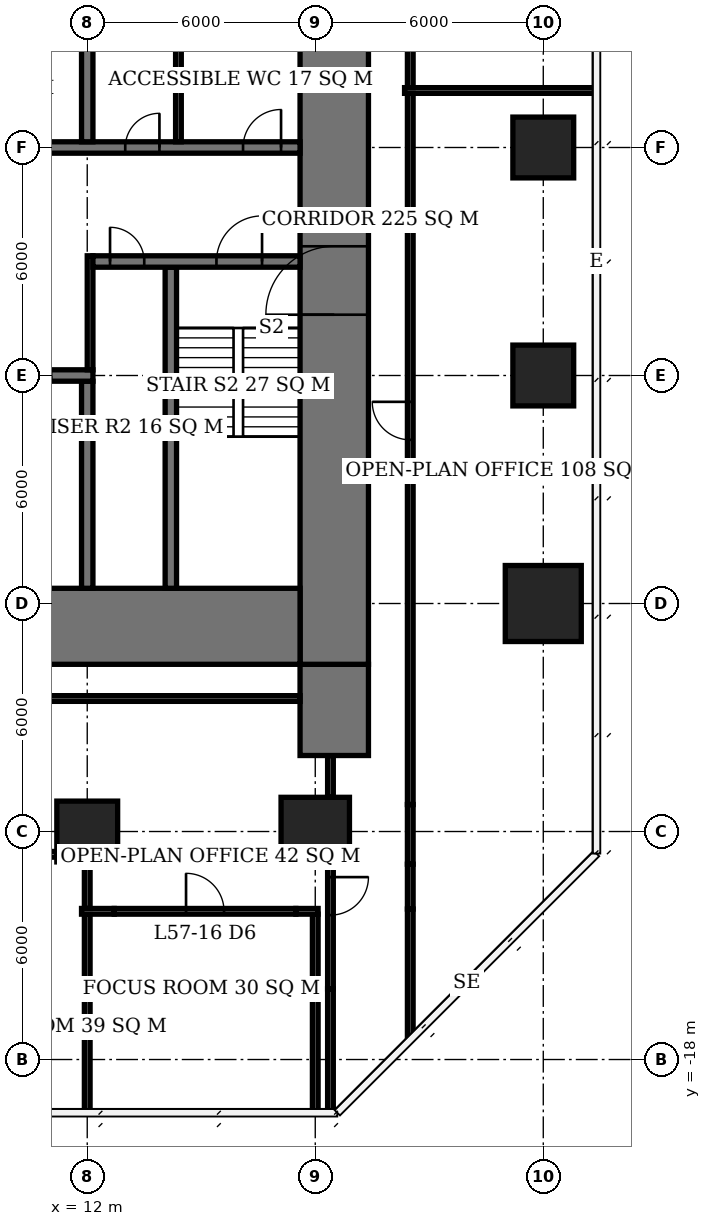
"""IFC4 building model, lengths in metres.
Left out: names, types, materials, properties, quantities, classifications, styles, units other than length and angle.
Written with IfcOpenShell. Run it as: python <this file> out.ifc"""

import sys

from ifc_helpers import new_model, si_unit, direction, frame, frame_2d, origin, origin_2d, place, context, subcontext, project, spatial, rectangle, extrude, element, fill, save


model = new_model("IFC4")
c1 = context("Model", 3, precision=1e-05, world=origin(), true_north=direction((0.0, 1.0)))
c2 = subcontext(c1, "Body", "Model", "MODEL_VIEW")
j1 = project(units=[si_unit("LENGTHUNIT", "METRE"), si_unit("PLANEANGLEUNIT", "RADIAN")], contexts=[c1])
p1 = place(None, origin())
s1 = spatial("IfcSite", under=j1, at=p1, CompositionType="ELEMENT")
p2 = place(p1, origin())
s2 = spatial("IfcBuilding", under=s1, at=p2, CompositionType="ELEMENT")
p3 = place(p2, frame((0.0, 0.0, 231.8)))
s3 = spatial("IfcBuildingStorey", under=s2, at=p3, CompositionType="ELEMENT", Elevation=231.8)
p4 = place(p3, frame((12.0, -12.0, 0.0), z_axis=(0.0, 0.0, 1.0), x_axis=(1.0, 0.0, 0.0)))
e1 = element("IfcColumn", 1, at=p4, inside=s3, PredefinedType="COLUMN", context=c2, shape_type="SweptSolid", body=[
    extrude(rectangle(XDim=1.6, YDim=1.6, at=origin_2d()), origin(), (0.0, 0.0, 1.0), 3.9),
])
p5 = place(p3, frame((18.0, -12.0, 0.0), z_axis=(0.0, 0.0, 1.0), x_axis=(1.0, 0.0, 0.0)))
e2 = element("IfcColumn", 2, at=p5, inside=s3, PredefinedType="COLUMN", context=c2, shape_type="SweptSolid", body=[
    extrude(rectangle(XDim=1.8, YDim=1.8, at=origin_2d()), origin(), (0.0, 0.0, 1.0), 3.9),
])
p6 = place(p3, frame((24.0, -6.0, 0.0), z_axis=(0.0, 0.0, 1.0), x_axis=(1.0, 0.0, 0.0)))
e3 = element("IfcColumn", 3, at=p6, inside=s3, PredefinedType="COLUMN", context=c2, shape_type="SweptSolid", body=[
    extrude(rectangle(XDim=2.0, YDim=2.0, at=origin_2d()), origin(), (0.0, 0.0, 1.0), 3.9),
])
for number, where, z_axis, x_axis in (
    (4, (24.0, 0.0, 0.0), (0.0, 0.0, 1.0), (1.0, 0.0, 0.0)),
    (5, (24.0, 6.0, 0.0), (0.0, 0.0, 1.0), (1.0, 0.0, 0.0)),
):
    element("IfcColumn", number, at=place(p3, frame(where, z_axis=z_axis, x_axis=x_axis)), inside=s3, PredefinedType="COLUMN", context=c2, shape_type="SweptSolid", body=[
        extrude(rectangle(XDim=1.6, YDim=1.6, at=origin_2d()), origin(), (0.0, 0.0, 1.0), 3.9),
    ])
p7 = place(p3, frame((-5.6, -6.6, 0.0), z_axis=(0.0, 0.0, 1.0), x_axis=(1.0, 0.0, 0.0)))
e6 = element("IfcWall", 6, at=p7, inside=s3, PredefinedType="SHEAR", context=c2, shape_type="SweptSolid", body=[
    extrude(rectangle(XDim=23.2, YDim=2.0, at=frame_2d((11.6, 0.0))), origin(), (0.0, 0.0, 1.0), 3.9),
])
p8 = place(p3, frame((18.5, -7.6, 0.0), z_axis=(0.0, 0.0, 1.0), x_axis=(0.0, 1.0, 0.0)))
e7 = element("IfcWall", 7, at=p8, inside=s3, PredefinedType="SHEAR", context=c2, shape_type="SweptSolid", body=[
    extrude(rectangle(XDim=21.2, YDim=1.8, at=frame_2d((10.6, 0.0))), origin(), (0.0, 0.0, 1.0), 3.9),
])
p9 = place(p8, frame((9.2, 0.0, 0.0)))
e8 = element("IfcOpeningElement", 8, at=p9, cuts=e7, PredefinedType="OPENING", context=c2, shape_type="SweptSolid", body=[
    extrude(rectangle(XDim=1.8, YDim=2.4, at=frame_2d((0.9, 1.2))), frame((0.0, 0.91, 0.0), z_axis=(0.0, -1.0, 0.0), x_axis=(1.0, 0.0, 0.0)), (0.0, 0.0, 1.0), 1.82),
])
p10 = place(p3, frame((18.5, -10.0, 0.0), z_axis=(0.0, 0.0, 1.0), x_axis=(0.0, 1.0, 0.0)))
e9 = element("IfcWall", 9, at=p10, inside=s3, PredefinedType="SHEAR", context=c2, shape_type="SweptSolid", body=[
    extrude(rectangle(XDim=2.4, YDim=1.8, at=frame_2d((1.2, 0.0))), origin(), (0.0, 0.0, 1.0), 3.9),
])
p11 = place(p3, frame((-5.6, 0.0, 0.0), z_axis=(0.0, 0.0, 1.0), x_axis=(1.0, 0.0, 0.0)))
e10 = element("IfcWall", 10, at=p11, inside=s3, PredefinedType="SHEAR", context=c2, shape_type="SweptSolid", body=[
    extrude(rectangle(XDim=17.75, YDim=0.3, at=frame_2d((8.875, 0.0))), origin(), (0.0, 0.0, 1.0), 3.9),
])
p12 = place(p11, frame((0.6, 0.0, 0.0)))
e11 = element("IfcOpeningElement", 11, at=p12, cuts=e10, PredefinedType="OPENING", context=c2, shape_type="SweptSolid", body=[
    extrude(rectangle(XDim=0.9, YDim=2.1, at=frame_2d((0.45, 1.05))), frame((0.0, 0.16, 0.0), z_axis=(0.0, -1.0, 0.0), x_axis=(1.0, 0.0, 0.0)), (0.0, 0.0, 1.0), 0.32),
])
p13 = place(p11, frame((3.7, 0.0, 0.0)))
e12 = element("IfcOpeningElement", 12, at=p13, cuts=e10, PredefinedType="OPENING", context=c2, shape_type="SweptSolid", body=[
    extrude(rectangle(XDim=0.9, YDim=2.1, at=frame_2d((0.45, 1.05))), frame((0.0, 0.16, 0.0), z_axis=(0.0, -1.0, 0.0), x_axis=(1.0, 0.0, 0.0)), (0.0, 0.0, 1.0), 0.32),
])
p14 = place(p11, frame((9.6, 0.0, 0.0)))
e13 = element("IfcOpeningElement", 13, at=p14, cuts=e10, PredefinedType="OPENING", context=c2, shape_type="SweptSolid", body=[
    extrude(rectangle(XDim=1.0, YDim=2.1, at=frame_2d((0.5, 1.05))), frame((0.0, 0.16, 0.0), z_axis=(0.0, -1.0, 0.0), x_axis=(1.0, 0.0, 0.0)), (0.0, 0.0, 1.0), 0.32),
])
p15 = place(p11, frame((12.55, 0.0, 0.0)))
e14 = element("IfcOpeningElement", 14, at=p15, cuts=e10, PredefinedType="OPENING", context=c2, shape_type="SweptSolid", body=[
    extrude(rectangle(XDim=1.1, YDim=2.1, at=frame_2d((0.55, 1.05))), frame((0.0, 0.16, 0.0), z_axis=(0.0, -1.0, 0.0), x_axis=(1.0, 0.0, 0.0)), (0.0, 0.0, 1.0), 0.32),
])
p16 = place(p11, frame((15.55, 0.0, 0.0)))
e15 = element("IfcOpeningElement", 15, at=p16, cuts=e10, PredefinedType="OPENING", context=c2, shape_type="SweptSolid", body=[
    extrude(rectangle(XDim=1.1, YDim=2.1, at=frame_2d((0.55, 1.05))), frame((0.0, 0.16, 0.0), z_axis=(0.0, -1.0, 0.0), x_axis=(1.0, 0.0, 0.0)), (0.0, 0.0, 1.0), 0.32),
])
p17 = place(p3, frame((12.15, 3.0, 0.0), z_axis=(0.0, 0.0, 1.0), x_axis=(1.0, 0.0, 0.0)))
e16 = element("IfcWall", 16, at=p17, inside=s3, PredefinedType="SHEAR", context=c2, shape_type="SweptSolid", body=[
    extrude(rectangle(XDim=5.45, YDim=0.3, at=frame_2d((2.725, 0.0))), origin(), (0.0, 0.0, 1.0), 3.9),
])
p18 = place(p17, frame((3.25, 0.0, 0.0)))
e17 = element("IfcOpeningElement", 17, at=p18, cuts=e16, PredefinedType="OPENING", context=c2, shape_type="SweptSolid", body=[
    extrude(rectangle(XDim=1.2, YDim=2.1, at=frame_2d((0.6, 1.05))), frame((0.0, 0.16, 0.0), z_axis=(0.0, -1.0, 0.0), x_axis=(1.0, 0.0, 0.0)), (0.0, 0.0, 1.0), 0.32),
])
p19 = place(p17, frame((0.45, 0.0, 0.0)))
e18 = element("IfcOpeningElement", 18, at=p19, cuts=e16, PredefinedType="OPENING", context=c2, shape_type="SweptSolid", body=[
    extrude(rectangle(XDim=0.9, YDim=2.1, at=frame_2d((0.45, 1.05))), frame((0.0, 0.16, 0.0), z_axis=(0.0, -1.0, 0.0), x_axis=(1.0, 0.0, 0.0)), (0.0, 0.0, 1.0), 0.32),
])
p20 = place(p3, frame((-0.15, 6.0, 0.0), z_axis=(0.0, 0.0, 1.0), x_axis=(1.0, 0.0, 0.0)))
e19 = element("IfcWall", 19, at=p20, inside=s3, PredefinedType="SHEAR", context=c2, shape_type="SweptSolid", body=[
    extrude(rectangle(XDim=17.75, YDim=0.3, at=frame_2d((8.875, 0.0))), origin(), (0.0, 0.0, 1.0), 3.9),
])
p21 = place(p20, frame((13.15, 0.0, 0.0)))
e20 = element("IfcOpeningElement", 20, at=p21, cuts=e19, PredefinedType="OPENING", context=c2, shape_type="SweptSolid", body=[
    extrude(rectangle(XDim=0.9, YDim=2.1, at=frame_2d((0.45, 1.05))), frame((0.0, 0.16, 0.0), z_axis=(0.0, -1.0, 0.0), x_axis=(1.0, 0.0, 0.0)), (0.0, 0.0, 1.0), 0.32),
])
p22 = place(p20, frame((16.25, 0.0, 0.0)))
e21 = element("IfcOpeningElement", 21, at=p22, cuts=e19, PredefinedType="OPENING", context=c2, shape_type="SweptSolid", body=[
    extrude(rectangle(XDim=1.0, YDim=2.1, at=frame_2d((0.5, 1.05))), frame((0.0, 0.16, 0.0), z_axis=(0.0, -1.0, 0.0), x_axis=(1.0, 0.0, 0.0)), (0.0, 0.0, 1.0), 0.32),
])
p23 = place(p20, frame((7.25, 0.0, 0.0)))
e22 = element("IfcOpeningElement", 22, at=p23, cuts=e19, PredefinedType="OPENING", context=c2, shape_type="SweptSolid", body=[
    extrude(rectangle(XDim=1.0, YDim=2.1, at=frame_2d((0.5, 1.05))), frame((0.0, 0.16, 0.0), z_axis=(0.0, -1.0, 0.0), x_axis=(1.0, 0.0, 0.0)), (0.0, 0.0, 1.0), 0.32),
])
p24 = place(p20, frame((1.1, 0.0, 0.0)))
e23 = element("IfcOpeningElement", 23, at=p24, cuts=e19, PredefinedType="OPENING", context=c2, shape_type="SweptSolid", body=[
    extrude(rectangle(XDim=1.1, YDim=2.1, at=frame_2d((0.55, 1.05))), frame((0.0, 0.16, 0.0), z_axis=(0.0, -1.0, 0.0), x_axis=(1.0, 0.0, 0.0)), (0.0, 0.0, 1.0), 0.32),
])
p25 = place(p20, frame((4.1, 0.0, 0.0)))
e24 = element("IfcOpeningElement", 24, at=p25, cuts=e19, PredefinedType="OPENING", context=c2, shape_type="SweptSolid", body=[
    extrude(rectangle(XDim=1.1, YDim=2.1, at=frame_2d((0.55, 1.05))), frame((0.0, 0.16, 0.0), z_axis=(0.0, -1.0, 0.0), x_axis=(1.0, 0.0, 0.0)), (0.0, 0.0, 1.0), 0.32),
])
for number, where, z_axis, x_axis in (
    (25, (12.0, -5.6, 0.0), (0.0, 0.0, 1.0), (0.0, 1.0, 0.0)),
    (26, (12.0, 6.15, 0.0), (0.0, 0.0, 1.0), (0.0, 1.0, 0.0)),
):
    element("IfcWall", number, at=place(p3, frame(where, z_axis=z_axis, x_axis=x_axis)), inside=s3, PredefinedType="SHEAR", context=c2, shape_type="SweptSolid", body=[
        extrude(rectangle(XDim=5.45, YDim=0.3, at=frame_2d((2.725, 0.0))), origin(), (0.0, 0.0, 1.0), 3.9),
    ])
p26 = place(p3, frame((14.2, -5.6, 0.0), z_axis=(0.0, 0.0, 1.0), x_axis=(0.0, 1.0, 0.0)))
e27 = element("IfcWall", 27, at=p26, inside=s3, PredefinedType="SHEAR", context=c2, shape_type="SweptSolid", body=[
    extrude(rectangle(XDim=8.45, YDim=0.3, at=frame_2d((4.225, 0.0))), origin(), (0.0, 0.0, 1.0), 3.9),
])
p27 = place(p3, frame((14.4, 6.15, 0.0), z_axis=(0.0, 0.0, 1.0), x_axis=(0.0, 1.0, 0.0)))
e28 = element("IfcWall", 28, at=p27, inside=s3, PredefinedType="PLUMBINGWALL", context=c2, shape_type="SweptSolid", body=[
    extrude(rectangle(XDim=5.45, YDim=0.15, at=frame_2d((2.725, 0.0))), origin(), (0.0, 0.0, 1.0), 3.65),
])
p28 = place(p3, frame((11.85, -14.1, 0.0), z_axis=(0.0, 0.0, 1.0), x_axis=(1.0, 0.0, 0.0)))
e29 = element("IfcWall", 29, at=p28, inside=s3, PredefinedType="PARTITIONING", context=c2, shape_type="SweptSolid", body=[
    extrude(rectangle(XDim=0.86, YDim=0.15, at=frame_2d((0.43, 0.0))), origin(), (0.0, 0.0, 1.0), 2.65),
])
p29 = place(p3, frame((12.71, -14.1, 0.0), z_axis=(0.0, 0.0, 1.0), x_axis=(1.0, 0.0, 0.0)))
e30 = element("IfcWall", 30, at=p29, inside=s3, PredefinedType="PARTITIONING", context=c2, shape_type="SweptSolid", body=[
    extrude(rectangle(XDim=4.78, YDim=0.15, at=frame_2d((2.39, 0.0))), origin(), (0.0, 0.0, 1.0), 3.65),
])
p30 = place(p29, frame((1.89, 0.0, 0.0)))
e31 = element("IfcOpeningElement", 31, at=p30, cuts=e30, PredefinedType="OPENING", context=c2, shape_type="SweptSolid", body=[
    extrude(rectangle(XDim=1.0, YDim=2.1, at=frame_2d((0.5, 1.05))), frame((0.0, 0.085, 0.0), z_axis=(0.0, -1.0, 0.0), x_axis=(1.0, 0.0, 0.0)), (0.0, 0.0, 1.0), 0.17),
])
p31 = place(p3, frame((17.49, -14.1, 0.0), z_axis=(0.0, 0.0, 1.0), x_axis=(1.0, 0.0, 0.0)))
e32 = element("IfcWall", 32, at=p31, inside=s3, PredefinedType="PARTITIONING", context=c2, shape_type="SweptSolid", body=[
    extrude(rectangle(XDim=0.585, YDim=0.15, at=frame_2d((0.292, 0.0))), origin(), (0.0, 0.0, 1.0), 2.65),
])
p32 = place(p3, frame((6.8, -12.6, 0.0), z_axis=(0.0, 0.0, 1.0), x_axis=(1.0, 0.0, 0.0)))
e33 = element("IfcWall", 33, at=p32, inside=s3, PredefinedType="PARTITIONING", context=c2, shape_type="SweptSolid", body=[
    extrude(rectangle(XDim=4.4, YDim=0.15, at=frame_2d((2.2, 0.0))), origin(), (0.0, 0.0, 1.0), 3.65),
])
p33 = place(p32, frame((1.7, 0.0, 0.0)))
e34 = element("IfcOpeningElement", 34, at=p33, cuts=e33, PredefinedType="OPENING", context=c2, shape_type="SweptSolid", body=[
    extrude(rectangle(XDim=1.0, YDim=2.1, at=frame_2d((0.5, 1.05))), frame((0.0, 0.085, 0.0), z_axis=(0.0, -1.0, 0.0), x_axis=(1.0, 0.0, 0.0)), (0.0, 0.0, 1.0), 0.17),
])
p34 = place(p3, frame((12.0, -19.4, 0.0), z_axis=(0.0, 0.0, 1.0), x_axis=(0.0, 1.0, 0.0)))
e35 = element("IfcWall", 35, at=p34, inside=s3, PredefinedType="PARTITIONING", context=c2, shape_type="SweptSolid", body=[
    extrude(rectangle(XDim=3.09, YDim=0.15, at=frame_2d((1.545, 0.0))), origin(), (0.0, 0.0, 1.0), 3.65),
])
p35 = place(p3, frame((12.0, -16.31, 0.0), z_axis=(0.0, 0.0, 1.0), x_axis=(0.0, 1.0, 0.0)))
e36 = element("IfcWall", 36, at=p35, inside=s3, PredefinedType="PARTITIONING", context=c2, shape_type="SweptSolid", body=[
    extrude(rectangle(XDim=2.135, YDim=0.15, at=frame_2d((1.067, 0.0))), origin(), (0.0, 0.0, 1.0), 2.65),
])
p36 = place(p3, frame((12.0, -14.025, 0.0), z_axis=(0.0, 0.0, 1.0), x_axis=(0.0, 1.0, 0.0)))
e37 = element("IfcWall", 37, at=p36, inside=s3, PredefinedType="PARTITIONING", context=c2, shape_type="SweptSolid", body=[
    extrude(rectangle(XDim=1.225, YDim=0.15, at=frame_2d((0.612, 0.0))), origin(), (0.0, 0.0, 1.0), 2.65),
])
p37 = place(p3, frame((18.0, -19.4, 0.0), z_axis=(0.0, 0.0, 1.0), x_axis=(0.0, 1.0, 0.0)))
e38 = element("IfcWall", 38, at=p37, inside=s3, PredefinedType="PARTITIONING", context=c2, shape_type="SweptSolid", body=[
    extrude(rectangle(XDim=3.09, YDim=0.15, at=frame_2d((1.545, 0.0))), origin(), (0.0, 0.0, 1.0), 3.65),
])
p38 = place(p3, frame((18.0, -16.31, 0.0), z_axis=(0.0, 0.0, 1.0), x_axis=(0.0, 1.0, 0.0)))
e39 = element("IfcWall", 39, at=p38, inside=s3, PredefinedType="PARTITIONING", context=c2, shape_type="SweptSolid", body=[
    extrude(rectangle(XDim=2.135, YDim=0.15, at=frame_2d((1.067, 0.0))), origin(), (0.0, 0.0, 1.0), 2.65),
])
p39 = place(p3, frame((10.575, -8.5, 0.0), z_axis=(0.0, 0.0, 1.0), x_axis=(1.0, 0.0, 0.0)))
e40 = element("IfcWall", 40, at=p39, inside=s3, PredefinedType="PARTITIONING", context=c2, shape_type="SweptSolid", body=[
    extrude(rectangle(XDim=7.025, YDim=0.15, at=frame_2d((3.513, 0.0))), origin(), (0.0, 0.0, 1.0), 3.65),
])
p40 = place(p3, frame((18.4, -19.4, 0.0), z_axis=(0.0, 0.0, 1.0), x_axis=(0.0, 1.0, 0.0)))
e41 = element("IfcWall", 41, at=p40, inside=s3, PredefinedType="PARTITIONING", context=c2, shape_type="SweptSolid", body=[
    extrude(rectangle(XDim=3.26, YDim=0.15, at=frame_2d((1.63, 0.0))), origin(), (0.0, 0.0, 1.0), 3.65),
])
p41 = place(p3, frame((18.4, -12.9, 0.0), z_axis=(0.0, 0.0, 1.0), x_axis=(0.0, -1.0, 0.0)))
e42 = element("IfcWall", 42, at=p41, inside=s3, PredefinedType="PARTITIONING", context=c2, shape_type="SweptSolid", body=[
    extrude(rectangle(XDim=3.24, YDim=0.15, at=frame_2d((1.62, 0.0))), origin(), (0.0, 0.0, 1.0), 2.65),
])
p42 = place(p41, frame((0.3, 0.0, 0.0)))
e43 = element("IfcOpeningElement", 43, at=p42, cuts=e42, PredefinedType="OPENING", context=c2, shape_type="SweptSolid", body=[
    extrude(rectangle(XDim=1.0, YDim=2.1, at=frame_2d((0.5, 1.05))), frame((0.0, 0.085, 0.0), z_axis=(0.0, -1.0, 0.0), x_axis=(1.0, 0.0, 0.0)), (0.0, 0.0, 1.0), 0.17),
])
p43 = place(p3, frame((18.4, -11.1, 0.0), z_axis=(0.0, 0.0, 1.0), x_axis=(0.0, 1.0, 0.0)))
e44 = element("IfcWall", 44, at=p43, inside=s3, PredefinedType="PARTITIONING", context=c2, shape_type="SweptSolid", body=[
    extrude(rectangle(XDim=1.1, YDim=0.15, at=frame_2d((0.55, 0.0))), origin(), (0.0, 0.0, 1.0), 3.65),
])
p44 = place(p3, frame((20.5, -17.388, 0.0), z_axis=(0.0, 0.0, 1.0), x_axis=(0.0, 1.0, 0.0)))
e45 = element("IfcWall", 45, at=p44, inside=s3, PredefinedType="PARTITIONING", context=c2, shape_type="SweptSolid", body=[
    extrude(rectangle(XDim=3.348, YDim=0.15, at=frame_2d((1.674, 0.0))), origin(), (0.0, 0.0, 1.0), 3.65),
])
p45 = place(p3, frame((20.5, -14.04, 0.0), z_axis=(0.0, 0.0, 1.0), x_axis=(0.0, 1.0, 0.0)))
e46 = element("IfcWall", 46, at=p45, inside=s3, PredefinedType="PARTITIONING", context=c2, shape_type="SweptSolid", body=[
    extrude(rectangle(XDim=1.18, YDim=0.15, at=frame_2d((0.59, 0.0))), origin(), (0.0, 0.0, 1.0), 2.65),
])
p46 = place(p3, frame((20.5, -12.86, 0.0), z_axis=(0.0, 0.0, 1.0), x_axis=(0.0, 1.0, 0.0)))
e47 = element("IfcWall", 47, at=p46, inside=s3, PredefinedType="PARTITIONING", context=c2, shape_type="SweptSolid", body=[
    extrude(rectangle(XDim=1.57, YDim=0.15, at=frame_2d((0.785, 0.0))), origin(), (0.0, 0.0, 1.0), 2.65),
])
p47 = place(p3, frame((20.5, -11.29, 0.0), z_axis=(0.0, 0.0, 1.0), x_axis=(0.0, 1.0, 0.0)))
e48 = element("IfcWall", 48, at=p47, inside=s3, PredefinedType="PARTITIONING", context=c2, shape_type="SweptSolid", body=[
    extrude(rectangle(XDim=18.715, YDim=0.15, at=frame_2d((9.357, 0.0))), origin(), (0.0, 0.0, 1.0), 3.65),
])
p48 = place(p47, frame((9.597, 0.0, 0.0)))
e49 = element("IfcOpeningElement", 49, at=p48, cuts=e48, PredefinedType="OPENING", context=c2, shape_type="SweptSolid", body=[
    extrude(rectangle(XDim=1.0, YDim=2.1, at=frame_2d((0.5, 1.05))), frame((0.0, 0.085, 0.0), z_axis=(0.0, -1.0, 0.0), x_axis=(1.0, 0.0, 0.0)), (0.0, 0.0, 1.0), 0.17),
])
p49 = place(p3, frame((20.5, 7.575, 0.0), z_axis=(0.0, 0.0, 1.0), x_axis=(0.0, 1.0, 0.0)))
e50 = element("IfcWall", 50, at=p49, inside=s3, PredefinedType="PARTITIONING", context=c2, shape_type="SweptSolid", body=[
    extrude(rectangle(XDim=15.813, YDim=0.15, at=frame_2d((7.906, 0.0))), origin(), (0.0, 0.0, 1.0), 3.65),
])
p50 = place(p49, frame((9.72, 0.0, 0.0)))
e51 = element("IfcOpeningElement", 51, at=p50, cuts=e50, PredefinedType="OPENING", context=c2, shape_type="SweptSolid", body=[
    extrude(rectangle(XDim=1.0, YDim=2.1, at=frame_2d((0.5, 1.05))), frame((0.0, 0.085, 0.0), z_axis=(0.0, -1.0, 0.0), x_axis=(1.0, 0.0, 0.0)), (0.0, 0.0, 1.0), 0.17),
])
p51 = place(p3, frame((20.35, 7.5, 0.0), z_axis=(0.0, 0.0, 1.0), x_axis=(1.0, 0.0, 0.0)))
e52 = element("IfcWall", 52, at=p51, inside=s3, PredefinedType="PARTITIONING", context=c2, shape_type="SweptSolid", body=[
    extrude(rectangle(XDim=5.05, YDim=0.15, at=frame_2d((2.525, 0.0))), origin(), (0.0, 0.0, 1.0), 3.65),
])
p52 = place(p3, frame((12.075, 0.15, 0.0), z_axis=(0.0, 0.0, 1.0), x_axis=(0.0, 1.0, 0.0)))
e53 = element("IfcWall", 53, at=p52, inside=s3, PredefinedType="PARTITIONING", context=c2, shape_type="SweptSolid", body=[
    extrude(rectangle(XDim=3.0, YDim=0.15, at=frame_2d((1.5, 0.0))), origin(), (0.0, 0.0, 1.0), 3.65),
])
p53 = place(p9, origin())
e54 = element("IfcDoor", 54, at=p53, inside=s3, OperationType="DOUBLE_DOOR_SINGLE_SWING", PredefinedType="DOOR", context=c2, shape_type="SweptSolid", body=[
    extrude(rectangle(XDim=1.8, YDim=2.4, at=frame_2d((0.9, 1.2))), frame((0.0, 0.025, 0.0), z_axis=(0.0, -1.0, 0.0), x_axis=(1.0, 0.0, 0.0)), (0.0, 0.0, 1.0), 0.05),
])
fill(e8, e54)
p54 = place(p18, origin())
e55 = element("IfcDoor", 55, at=p54, inside=s3, OperationType="SINGLE_SWING_RIGHT", PredefinedType="DOOR", context=c2, shape_type="SweptSolid", body=[
    extrude(rectangle(XDim=1.2, YDim=2.1, at=frame_2d((0.6, 1.05))), frame((0.0, 0.025, 0.0), z_axis=(0.0, -1.0, 0.0), x_axis=(1.0, 0.0, 0.0)), (0.0, 0.0, 1.0), 0.05),
])
fill(e17, e55)
p55 = place(p19, origin())
e56 = element("IfcDoor", 56, at=p55, inside=s3, OperationType="SINGLE_SWING_LEFT", PredefinedType="DOOR", context=c2, shape_type="SweptSolid", body=[
    extrude(rectangle(XDim=0.9, YDim=2.1, at=frame_2d((0.45, 1.05))), frame((0.0, 0.025, 0.0), z_axis=(0.0, -1.0, 0.0), x_axis=(1.0, 0.0, 0.0)), (0.0, 0.0, 1.0), 0.05),
])
fill(e18, e56)
p56 = place(p21, origin())
e57 = element("IfcDoor", 57, at=p56, inside=s3, OperationType="SINGLE_SWING_RIGHT", PredefinedType="DOOR", context=c2, shape_type="SweptSolid", body=[
    extrude(rectangle(XDim=0.9, YDim=2.1, at=frame_2d((0.45, 1.05))), frame((0.0, 0.025, 0.0), z_axis=(0.0, -1.0, 0.0), x_axis=(1.0, 0.0, 0.0)), (0.0, 0.0, 1.0), 0.05),
])
fill(e20, e57)
p57 = place(p22, origin())
e58 = element("IfcDoor", 58, at=p57, inside=s3, OperationType="SINGLE_SWING_RIGHT", PredefinedType="DOOR", context=c2, shape_type="SweptSolid", body=[
    extrude(rectangle(XDim=1.0, YDim=2.1, at=frame_2d((0.5, 1.05))), frame((0.0, 0.025, 0.0), z_axis=(0.0, -1.0, 0.0), x_axis=(1.0, 0.0, 0.0)), (0.0, 0.0, 1.0), 0.05),
])
fill(e21, e58)
p58 = place(p30, origin())
e59 = element("IfcDoor", 59, at=p58, inside=s3, OperationType="SINGLE_SWING_LEFT", PredefinedType="DOOR", context=c2, shape_type="SweptSolid", body=[
    extrude(rectangle(XDim=1.0, YDim=2.1, at=frame_2d((0.5, 1.05))), frame((0.0, 0.025, 0.0), z_axis=(0.0, -1.0, 0.0), x_axis=(1.0, 0.0, 0.0)), (0.0, 0.0, 1.0), 0.05),
])
fill(e31, e59)
p59 = place(p48, origin())
e60 = element("IfcDoor", 60, at=p59, inside=s3, OperationType="SINGLE_SWING_RIGHT", PredefinedType="DOOR", context=c2, shape_type="SweptSolid", body=[
    extrude(rectangle(XDim=1.0, YDim=2.1, at=frame_2d((0.5, 1.05))), frame((0.0, 0.025, 0.0), z_axis=(0.0, -1.0, 0.0), x_axis=(1.0, 0.0, 0.0)), (0.0, 0.0, 1.0), 0.05),
])
fill(e49, e60)
p60 = place(p42, origin())
e61 = element("IfcDoor", 61, at=p60, inside=s3, OperationType="SINGLE_SWING_LEFT", PredefinedType="DOOR", context=c2, shape_type="SweptSolid", body=[
    extrude(rectangle(XDim=1.0, YDim=2.1, at=frame_2d((0.5, 1.05))), frame((0.0, 0.025, 0.0), z_axis=(0.0, -1.0, 0.0), x_axis=(1.0, 0.0, 0.0)), (0.0, 0.0, 1.0), 0.05),
])
fill(e43, e61)
save(model, sys.argv[1])
